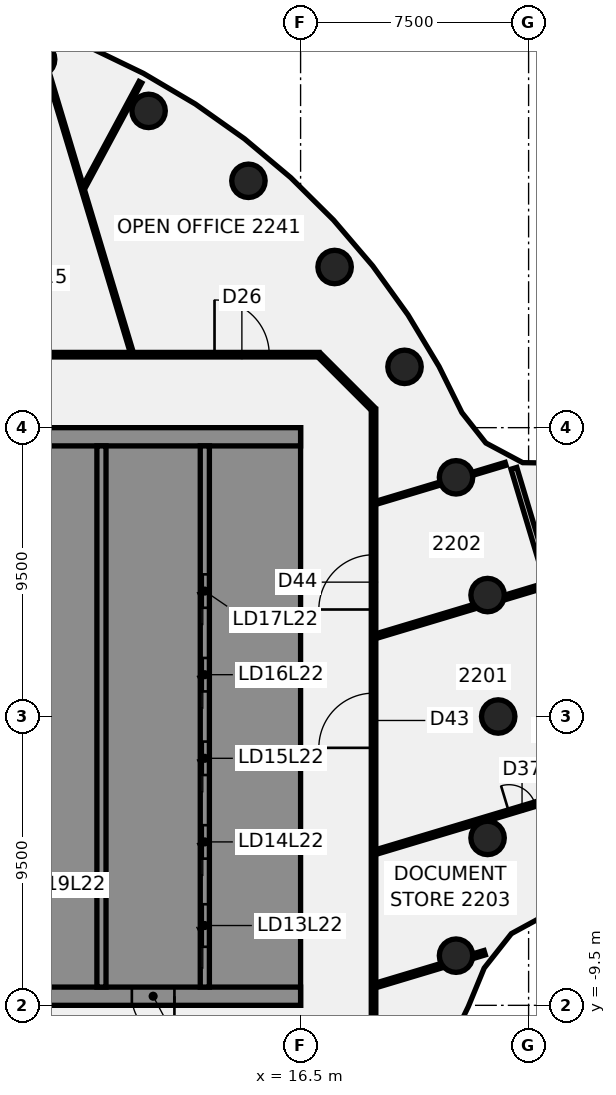
"""IFC4 building model, lengths in metres.
Left out: names, types, materials, properties, quantities, classifications, styles, units other than length and angle.
Written with IfcOpenShell. Run it as: python <this file> out.ifc"""

import sys

from ifc_helpers import new_model, si_unit, direction, frame, frame_2d, origin, origin_2d, place, context, subcontext, project, spatial, polyline, rectangle, circle, outline, extrude, element, fill, save


model = new_model("IFC4")
c1 = context("Model", 3, precision=1e-05, world=origin(), true_north=direction((0.0, 1.0)))
c2 = subcontext(c1, "Body", "Model", "MODEL_VIEW")
j1 = project(units=[si_unit("LENGTHUNIT", "METRE"), si_unit("PLANEANGLEUNIT", "RADIAN")], contexts=[c1])
p1 = place(None, origin())
s1 = spatial("IfcSite", under=j1, at=p1, CompositionType="ELEMENT")
p2 = place(p1, origin())
s2 = spatial("IfcBuilding", under=s1, at=p2, CompositionType="ELEMENT")
p3 = place(p2, frame((0.0, 0.0, 94.75)))
s3 = spatial("IfcBuildingStorey", under=s2, at=p3, CompositionType="ELEMENT", Elevation=94.75)
for number, where, z_axis, x_axis in (
    (1, (23.0, 0.0, -0.14), (0.0, 0.0, 1.0), (1.0, 0.0, 0.0)),
    (2, (22.651, 3.994, -0.14), (0.0, 0.0, 1.0), (1.0, 0.0, 0.0)),
    (3, (21.613, 7.866, -0.14), (0.0, 0.0, 1.0), (1.0, 0.0, 0.0)),
    (4, (19.919, 11.5, -0.14), (0.0, 0.0, 1.0), (1.0, 0.0, 0.0)),
    (5, (17.619, 14.784, -0.14), (0.0, 0.0, 1.0), (1.0, 0.0, 0.0)),
    (6, (14.784, 17.619, -0.14), (0.0, 0.0, 1.0), (1.0, 0.0, 0.0)),
    (7, (11.5, 19.919, -0.14), (0.0, 0.0, 1.0), (1.0, 0.0, 0.0)),
    (8, (7.866, 21.613, -0.14), (0.0, 0.0, 1.0), (1.0, 0.0, 0.0)),
    (9, (21.613, -7.866, -0.14), (0.0, 0.0, 1.0), (1.0, 0.0, 0.0)),
    (10, (22.651, -3.994, -0.14), (0.0, 0.0, 1.0), (1.0, 0.0, 0.0)),
):
    element("IfcColumn", number, at=place(p3, frame(where, z_axis=z_axis, x_axis=x_axis)), inside=s3, PredefinedType="COLUMN", context=c2, shape_type="SweptSolid", body=[
        extrude(circle(Radius=0.55, at=origin_2d()), origin(), (0.0, 0.0, 1.0), 3.75),
    ])
p4 = place(p3, frame((8.186, 21.167, 0.0), z_axis=(0.0, 0.0, 1.0), x_axis=(0.287669804992, -0.957729650421, 0.0)))
e11 = element("IfcWall", 11, at=p4, inside=s3, PredefinedType="PARTITIONING", context=c2, shape_type="SweptSolid", body=[
    extrude(rectangle(XDim=9.601, YDim=0.1, at=frame_2d((4.801, 0.0))), origin(), (0.0, 0.0, 1.0), 3.01),
])
p5 = place(p3, frame((23.516, 8.163, 0.0), z_axis=(0.0, 0.0, 1.0), x_axis=(0.287459233433, -0.957792873806, 0.0)))
e12 = element("IfcWall", 12, at=p5, inside=s3, PredefinedType="PARTITIONING", context=c2, shape_type="SweptSolid", body=[
    extrude(rectangle(XDim=14.081, YDim=0.2, at=frame_2d((7.04, 0.0))), origin(), (0.0, 0.0, 1.0), 3.01),
])
p6 = place(p5, frame((6.482, 0.0, 0.0)))
e13 = element("IfcOpeningElement", 13, at=p6, cuts=e12, PredefinedType="OPENING", context=c2, shape_type="SweptSolid", body=[
    extrude(rectangle(XDim=1.4, YDim=2.1, at=frame_2d((0.7, 1.05))), frame((0.0, 0.11, 0.0), z_axis=(0.0, -1.0, 0.0), x_axis=(1.0, 0.0, 0.0)), (0.0, 0.0, 1.0), 0.22),
])
p7 = place(p3, frame((17.128, 11.872, 0.0), z_axis=(0.0, 0.0, 1.0), x_axis=(0.707106781187, -0.707106781187, 0.0)))
e14 = element("IfcWall", 14, at=p7, inside=s3, PredefinedType="PARTITIONING", context=c2, shape_type="SweptSolid", body=[
    extrude(rectangle(XDim=2.465, YDim=0.15, at=frame_2d((1.232, 0.0))), origin(), (0.0, 0.0, 1.0), 3.01),
])
p8 = place(p3, frame((-17.065, 11.9, 0.0), z_axis=(0.0, 0.0, 1.0), x_axis=(1.0, 0.0, 0.0)))
e15 = element("IfcWall", 15, at=p8, inside=s3, PredefinedType="PARTITIONING", context=c2, shape_type="SweptSolid", body=[
    extrude(rectangle(XDim=34.165, YDim=0.15, at=frame_2d((17.083, 0.0))), origin(), (0.0, 0.0, 1.0), 3.01),
])
p9 = place(p8, frame((19.248, 0.0, 0.0)))
e16 = element("IfcOpeningElement", 16, at=p9, cuts=e15, PredefinedType="OPENING", context=c2, shape_type="SweptSolid", body=[
    extrude(rectangle(XDim=1.8, YDim=2.1, at=frame_2d((0.9, 1.05))), frame((0.0, 0.085, 0.0), z_axis=(0.0, -1.0, 0.0), x_axis=(1.0, 0.0, 0.0)), (0.0, 0.0, 1.0), 0.17),
])
p10 = place(p8, frame((30.734, 0.0, 0.0)))
e17 = element("IfcOpeningElement", 17, at=p10, cuts=e15, PredefinedType="OPENING", context=c2, shape_type="SweptSolid", body=[
    extrude(rectangle(XDim=1.8, YDim=2.1, at=frame_2d((0.9, 1.05))), frame((0.0, 0.085, 0.0), z_axis=(0.0, -1.0, 0.0), x_axis=(1.0, 0.0, 0.0)), (0.0, 0.0, 1.0), 0.17),
])
p11 = place(p8, frame((5.215, 0.0, 0.0)))
e18 = element("IfcOpeningElement", 18, at=p11, cuts=e15, PredefinedType="OPENING", context=c2, shape_type="SweptSolid", body=[
    extrude(rectangle(XDim=1.8, YDim=2.1, at=frame_2d((0.9, 1.05))), frame((0.0, 0.085, 0.0), z_axis=(0.0, -1.0, 0.0), x_axis=(1.0, 0.0, 0.0)), (0.0, 0.0, 1.0), 0.17),
])
p12 = place(p3, frame((18.977, -4.458, 0.0), z_axis=(0.0, 0.0, 1.0), x_axis=(0.957722947088, 0.287692121236, 0.0)))
e19 = element("IfcWall", 19, at=p12, inside=s3, PredefinedType="PARTITIONING", context=c2, shape_type="SweptSolid", body=[
    extrude(rectangle(XDim=7.873, YDim=0.15, at=frame_2d((3.936, 0.0))), origin(), (0.0, 0.0, 1.0), 3.01),
])
p13 = place(p12, frame((4.57, 0.0, 0.0)))
e20 = element("IfcOpeningElement", 20, at=p13, cuts=e19, PredefinedType="OPENING", context=c2, shape_type="SweptSolid", body=[
    extrude(rectangle(XDim=0.9, YDim=2.1, at=frame_2d((0.45, 1.05))), frame((0.0, 0.085, 0.0), z_axis=(0.0, -1.0, 0.0), x_axis=(1.0, 0.0, 0.0)), (0.0, 0.0, 1.0), 0.17),
])
p14 = place(p3, frame((18.977, 2.642, 0.0), z_axis=(0.0, 0.0, 1.0), x_axis=(0.957759484512, 0.287570460631, 0.0)))
e21 = element("IfcWall", 21, at=p14, inside=s3, PredefinedType="PARTITIONING", context=c2, shape_type="SweptSolid", body=[
    extrude(rectangle(XDim=3.421, YDim=0.15, at=frame_2d((1.711, 0.0))), origin(), (0.0, 0.0, 1.0), 3.01),
])
p15 = place(p3, frame((23.187, 3.906, 0.0), z_axis=(0.0, 0.0, 1.0), x_axis=(0.957756211779, 0.287581360313, 0.0)))
e22 = element("IfcWall", 22, at=p15, inside=s3, PredefinedType="PARTITIONING", context=c2, shape_type="SweptSolid", body=[
    extrude(rectangle(XDim=1.439, YDim=0.15, at=frame_2d((0.719, 0.0))), origin(), (0.0, 0.0, 1.0), 3.01),
])
p16 = place(p3, frame((18.972, 7.026, 0.0), z_axis=(0.0, 0.0, 1.0), x_axis=(0.95774183444, 0.287629238019, 0.0)))
e23 = element("IfcWall", 23, at=p16, inside=s3, PredefinedType="PARTITIONING", context=c2, shape_type="SweptSolid", body=[
    extrude(rectangle(XDim=2.229, YDim=0.1, at=frame_2d((1.115, 0.0))), origin(), (0.0, 0.0, 1.0), 3.01),
])
p17 = place(p3, frame((22.143, 7.978, 0.0), z_axis=(0.0, 0.0, 1.0), x_axis=(0.957738472146, 0.287640433477, 0.0)))
e24 = element("IfcWall", 24, at=p17, inside=s3, PredefinedType="PARTITIONING", context=c2, shape_type="SweptSolid", body=[
    extrude(rectangle(XDim=1.148, YDim=0.1, at=frame_2d((0.574, 0.0))), origin(), (0.0, 0.0, 1.0), 3.01),
])
p18 = place(p3, frame((18.977, -8.843, 0.0), z_axis=(0.0, 0.0, 1.0), x_axis=(0.957755743007, 0.287582921496, 0.0)))
e25 = element("IfcWall", 25, at=p18, inside=s3, PredefinedType="PARTITIONING", context=c2, shape_type="SweptSolid", body=[
    extrude(rectangle(XDim=2.287, YDim=0.15, at=frame_2d((1.144, 0.0))), origin(), (0.0, 0.0, 1.0), 3.01),
])
p19 = place(p3, frame((22.168, -7.885, 0.0), z_axis=(0.0, 0.0, 1.0), x_axis=(0.957726632794, 0.287679851286, 0.0)))
e26 = element("IfcWall", 26, at=p19, inside=s3, PredefinedType="PARTITIONING", context=c2, shape_type="SweptSolid", body=[
    extrude(rectangle(XDim=0.405, YDim=0.15, at=frame_2d((0.202, 0.0))), origin(), (0.0, 0.0, 1.0), 3.01),
])
p20 = place(p3, frame((9.383, 17.427, 0.0), z_axis=(0.0, 0.0, 1.0), x_axis=(0.47397663643, 0.880537420056, 0.0)))
e27 = element("IfcWall", 27, at=p20, inside=s3, PredefinedType="PARTITIONING", context=c2, shape_type="SweptSolid", body=[
    extrude(rectangle(XDim=3.9, YDim=0.1, at=frame_2d((1.95, 0.0))), origin(), (0.0, 0.0, 1.0), 3.01),
])
p21 = place(p3, frame((18.9, -10.1, 0.0), z_axis=(0.0, 0.0, 1.0), x_axis=(0.0, 1.0, 0.0)))
e28 = element("IfcWall", 28, at=p21, inside=s3, PredefinedType="PARTITIONING", context=c2, shape_type="SweptSolid", body=[
    extrude(rectangle(XDim=20.2, YDim=0.15, at=frame_2d((10.1, 0.0))), origin(), (0.0, 0.0, 1.0), 3.01),
])
p22 = place(p21, frame((9.069, 0.0, 0.0)))
e29 = element("IfcOpeningElement", 29, at=p22, cuts=e28, PredefinedType="OPENING", context=c2, shape_type="SweptSolid", body=[
    extrude(rectangle(XDim=1.8, YDim=2.1, at=frame_2d((0.9, 1.05))), frame((0.0, 0.085, 0.0), z_axis=(0.0, -1.0, 0.0), x_axis=(1.0, 0.0, 0.0)), (0.0, 0.0, 1.0), 0.17),
])
p23 = place(p21, frame((13.619, 0.0, 0.0)))
e30 = element("IfcOpeningElement", 30, at=p23, cuts=e28, PredefinedType="OPENING", context=c2, shape_type="SweptSolid", body=[
    extrude(rectangle(XDim=1.8, YDim=2.1, at=frame_2d((0.9, 1.05))), frame((0.0, 0.085, 0.0), z_axis=(0.0, -1.0, 0.0), x_axis=(1.0, 0.0, 0.0)), (0.0, 0.0, 1.0), 0.17),
])
p24 = place(p3, frame((16.5, -9.2, 0.0), z_axis=(0.0, 0.0, 1.0), x_axis=(-1.0, 0.0, 0.0)))
e31 = element("IfcWall", 31, at=p24, inside=s3, PredefinedType="SHEAR", context=c2, shape_type="SweptSolid", body=[
    extrude(rectangle(XDim=13.0, YDim=0.6, at=frame_2d((6.5, 0.0))), origin(), (0.0, 0.0, 1.0), 3.61),
])
p25 = place(p24, frame((4.15, 0.0, 0.0)))
e32 = element("IfcOpeningElement", 32, at=p25, cuts=e31, PredefinedType="OPENING", context=c2, shape_type="SweptSolid", body=[
    extrude(rectangle(XDim=1.4, YDim=2.1, at=frame_2d((0.7, 1.05))), frame((0.0, 0.31, 0.0), z_axis=(0.0, -1.0, 0.0), x_axis=(1.0, 0.0, 0.0)), (0.0, 0.0, 1.0), 0.62),
])
p26 = place(p24, frame((10.125, 0.0, 0.0)))
e33 = element("IfcOpeningElement", 33, at=p26, cuts=e31, PredefinedType="OPENING", context=c2, shape_type="SweptSolid", body=[
    extrude(rectangle(XDim=1.4, YDim=2.1, at=frame_2d((0.7, 1.05))), frame((0.0, 0.31, 0.0), z_axis=(0.0, -1.0, 0.0), x_axis=(1.0, 0.0, 0.0)), (0.0, 0.0, 1.0), 0.62),
])
p27 = place(p3, origin())
e34 = element("IfcWall", 34, at=p27, inside=s3, PredefinedType="SHEAR", context=c2, shape_type="SweptSolid", body=[
    extrude(outline(polyline([(13.5, -8.9), (15.9, -8.9), (16.5, -8.9), (16.5, 8.9), (15.9, 8.9), (13.5, 8.9), (13.5, 8.125), (15.9, 8.125), (15.9, 5.625), (13.5, 5.625), (13.5, 5.375), (15.9, 5.375), (15.9, 2.875), (13.5, 2.875), (13.5, 2.625), (15.9, 2.625), (15.9, 0.125), (13.5, 0.125), (13.5, -0.125), (15.9, -0.125), (15.9, -2.625), (13.5, -2.625), (13.5, -2.875), (15.9, -2.875), (15.9, -5.375), (13.5, -5.375), (13.5, -5.625), (15.9, -5.625), (15.9, -8.125), (13.5, -8.125), (13.5, -8.9)])), origin(), (0.0, 0.0, 1.0), 3.61),
])
p28 = place(p3, frame((16.5, 9.2, 0.0), z_axis=(0.0, 0.0, 1.0), x_axis=(-1.0, 0.0, 0.0)))
e35 = element("IfcWall", 35, at=p28, inside=s3, PredefinedType="SHEAR", context=c2, shape_type="SweptSolid", body=[
    extrude(rectangle(XDim=13.0, YDim=0.6, at=frame_2d((6.5, 0.0))), origin(), (0.0, 0.0, 1.0), 3.61),
])
p29 = place(p3, origin())
e36 = element("IfcWall", 36, at=p29, inside=s3, PredefinedType="SHEAR", context=c2, shape_type="SweptSolid", body=[
    extrude(outline(polyline([(9.8, -5.375), (7.5, -5.375), (7.5, -2.875), (9.8, -2.875), (9.8, -2.625), (7.5, -2.625), (7.5, -0.125), (9.8, -0.125), (9.8, 0.125), (7.5, 0.125), (7.5, 2.625), (9.8, 2.625), (9.8, 2.875), (7.5, 2.875), (7.5, 5.375), (9.8, 5.375), (9.8, 5.625), (7.5, 5.625), (7.5, 8.125), (9.8, 8.125), (9.8, 8.9), (7.5, 8.9), (7.2, 8.9), (7.2, -5.625), (7.5, -5.625), (9.8, -5.625), (9.8, -5.375)])), origin(), (0.0, 0.0, 1.0), 3.61),
])
p30 = place(p3, origin())
e37 = element("IfcWall", 37, at=p30, inside=s3, PredefinedType="SHEAR", context=c2, shape_type="SweptSolid", body=[
    extrude(outline(polyline([(7.5, -8.125), (7.5, -8.9), (9.8, -8.9), (9.8, -8.125), (9.8, -5.625), (9.55, -5.625), (9.55, -8.125), (7.5, -8.125)])), origin(), (0.0, 0.0, 1.0), 3.61),
])
p31 = place(p3, frame((13.35, -8.9, 0.0), z_axis=(0.0, 0.0, 1.0), x_axis=(0.0, 1.0, 0.0)))
e38 = element("IfcWall", 38, at=p31, inside=s3, PredefinedType="SHEAR", context=c2, shape_type="SweptSolid", body=[
    extrude(rectangle(XDim=17.8, YDim=0.3, at=frame_2d((8.9, 0.0))), origin(), (0.0, 0.0, 1.0), 3.61),
])
p32 = place(p31, frame((1.325, 0.0, 0.0)))
e39 = element("IfcOpeningElement", 39, at=p32, cuts=e38, PredefinedType="OPENING", context=c2, shape_type="SweptSolid", body=[
    extrude(rectangle(XDim=1.4, YDim=2.1, at=frame_2d((0.7, 1.05))), frame((0.0, 0.16, 0.0), z_axis=(0.0, -1.0, 0.0), x_axis=(1.0, 0.0, 0.0)), (0.0, 0.0, 1.0), 0.32),
])
p33 = place(p31, frame((4.225, 0.0, 0.0)))
e40 = element("IfcOpeningElement", 40, at=p33, cuts=e38, PredefinedType="OPENING", context=c2, shape_type="SweptSolid", body=[
    extrude(rectangle(XDim=1.1, YDim=2.1, at=frame_2d((0.55, 1.05))), frame((0.0, 0.16, 0.0), z_axis=(0.0, -1.0, 0.0), x_axis=(1.0, 0.0, 0.0)), (0.0, 0.0, 1.0), 0.32),
])
p34 = place(p31, frame((6.975, 0.0, 0.0)))
e41 = element("IfcOpeningElement", 41, at=p34, cuts=e38, PredefinedType="OPENING", context=c2, shape_type="SweptSolid", body=[
    extrude(rectangle(XDim=1.1, YDim=2.1, at=frame_2d((0.55, 1.05))), frame((0.0, 0.16, 0.0), z_axis=(0.0, -1.0, 0.0), x_axis=(1.0, 0.0, 0.0)), (0.0, 0.0, 1.0), 0.32),
])
p35 = place(p31, frame((9.725, 0.0, 0.0)))
e42 = element("IfcOpeningElement", 42, at=p35, cuts=e38, PredefinedType="OPENING", context=c2, shape_type="SweptSolid", body=[
    extrude(rectangle(XDim=1.1, YDim=2.1, at=frame_2d((0.55, 1.05))), frame((0.0, 0.16, 0.0), z_axis=(0.0, -1.0, 0.0), x_axis=(1.0, 0.0, 0.0)), (0.0, 0.0, 1.0), 0.32),
])
p36 = place(p31, frame((12.475, 0.0, 0.0)))
e43 = element("IfcOpeningElement", 43, at=p36, cuts=e38, PredefinedType="OPENING", context=c2, shape_type="SweptSolid", body=[
    extrude(rectangle(XDim=1.1, YDim=2.1, at=frame_2d((0.55, 1.05))), frame((0.0, 0.16, 0.0), z_axis=(0.0, -1.0, 0.0), x_axis=(1.0, 0.0, 0.0)), (0.0, 0.0, 1.0), 0.32),
])
p37 = place(p3, frame((9.95, -8.9, 0.0), z_axis=(0.0, 0.0, 1.0), x_axis=(0.0, 1.0, 0.0)))
e44 = element("IfcWall", 44, at=p37, inside=s3, PredefinedType="SHEAR", context=c2, shape_type="SweptSolid", body=[
    extrude(rectangle(XDim=17.8, YDim=0.3, at=frame_2d((8.9, 0.0))), origin(), (0.0, 0.0, 1.0), 3.61),
])
p38 = place(p10, origin())
e45 = element("IfcDoor", 45, at=p38, inside=s3, OperationType="DOUBLE_DOOR_SINGLE_SWING", PredefinedType="DOOR", context=c2, shape_type="SweptSolid", body=[
    extrude(rectangle(XDim=1.8, YDim=2.1, at=frame_2d((0.9, 1.05))), frame((0.0, 0.025, 0.0), z_axis=(0.0, -1.0, 0.0), x_axis=(1.0, 0.0, 0.0)), (0.0, 0.0, 1.0), 0.05),
])
fill(e17, e45)
p39 = place(p13, frame((0.9, 0.0, 0.0), z_axis=(0.0, 0.0, 1.0), x_axis=(-1.0, 0.0, 0.0)))
e46 = element("IfcDoor", 46, at=p39, inside=s3, OperationType="SINGLE_SWING_RIGHT", PredefinedType="DOOR", context=c2, shape_type="SweptSolid", body=[
    extrude(rectangle(XDim=0.9, YDim=2.1, at=frame_2d((0.45, 1.05))), frame((0.0, 0.025, 0.0), z_axis=(0.0, -1.0, 0.0), x_axis=(1.0, 0.0, 0.0)), (0.0, 0.0, 1.0), 0.05),
])
fill(e20, e46)
p40 = place(p22, origin())
e47 = element("IfcDoor", 47, at=p40, inside=s3, OperationType="DOUBLE_DOOR_SINGLE_SWING", PredefinedType="DOOR", context=c2, shape_type="SweptSolid", body=[
    extrude(rectangle(XDim=1.8, YDim=2.1, at=frame_2d((0.9, 1.05))), frame((0.0, 0.025, 0.0), z_axis=(0.0, -1.0, 0.0), x_axis=(1.0, 0.0, 0.0)), (0.0, 0.0, 1.0), 0.05),
])
fill(e29, e47)
p41 = place(p23, frame((1.8, 0.0, 0.0), z_axis=(0.0, 0.0, 1.0), x_axis=(-1.0, 0.0, 0.0)))
e48 = element("IfcDoor", 48, at=p41, inside=s3, OperationType="DOUBLE_DOOR_SINGLE_SWING", PredefinedType="DOOR", context=c2, shape_type="SweptSolid", body=[
    extrude(rectangle(XDim=1.8, YDim=2.1, at=frame_2d((0.9, 1.05))), frame((0.0, 0.025, 0.0), z_axis=(0.0, -1.0, 0.0), x_axis=(1.0, 0.0, 0.0)), (0.0, 0.0, 1.0), 0.05),
])
fill(e30, e48)
p42 = place(p25, origin())
e49 = element("IfcDoor", 49, at=p42, inside=s3, OperationType="SINGLE_SWING_LEFT", PredefinedType="DOOR", context=c2, shape_type="SweptSolid", body=[
    extrude(rectangle(XDim=1.4, YDim=2.1, at=frame_2d((0.7, 1.05))), frame((0.0, 0.025, 0.0), z_axis=(0.0, -1.0, 0.0), x_axis=(1.0, 0.0, 0.0)), (0.0, 0.0, 1.0), 0.05),
])
fill(e32, e49)
p43 = place(p32, origin())
e50 = element("IfcDoor", 50, at=p43, inside=s3, OperationType="SLIDING_TO_LEFT", PredefinedType="DOOR", context=c2, shape_type="SweptSolid", body=[
    extrude(rectangle(XDim=1.4, YDim=2.1, at=frame_2d((0.7, 1.05))), frame((0.0, 0.025, 0.0), z_axis=(0.0, -1.0, 0.0), x_axis=(1.0, 0.0, 0.0)), (0.0, 0.0, 1.0), 0.05),
])
fill(e39, e50)
p44 = place(p33, origin())
e51 = element("IfcDoor", 51, at=p44, inside=s3, OperationType="SLIDING_TO_LEFT", PredefinedType="DOOR", context=c2, shape_type="SweptSolid", body=[
    extrude(rectangle(XDim=1.1, YDim=2.1, at=frame_2d((0.55, 1.05))), frame((0.0, 0.025, 0.0), z_axis=(0.0, -1.0, 0.0), x_axis=(1.0, 0.0, 0.0)), (0.0, 0.0, 1.0), 0.05),
])
fill(e40, e51)
p45 = place(p34, origin())
e52 = element("IfcDoor", 52, at=p45, inside=s3, OperationType="SLIDING_TO_LEFT", PredefinedType="DOOR", context=c2, shape_type="SweptSolid", body=[
    extrude(rectangle(XDim=1.1, YDim=2.1, at=frame_2d((0.55, 1.05))), frame((0.0, 0.025, 0.0), z_axis=(0.0, -1.0, 0.0), x_axis=(1.0, 0.0, 0.0)), (0.0, 0.0, 1.0), 0.05),
])
fill(e41, e52)
p46 = place(p35, origin())
e53 = element("IfcDoor", 53, at=p46, inside=s3, OperationType="SLIDING_TO_LEFT", PredefinedType="DOOR", context=c2, shape_type="SweptSolid", body=[
    extrude(rectangle(XDim=1.1, YDim=2.1, at=frame_2d((0.55, 1.05))), frame((0.0, 0.025, 0.0), z_axis=(0.0, -1.0, 0.0), x_axis=(1.0, 0.0, 0.0)), (0.0, 0.0, 1.0), 0.05),
])
fill(e42, e53)
p47 = place(p36, origin())
e54 = element("IfcDoor", 54, at=p47, inside=s3, OperationType="SLIDING_TO_LEFT", PredefinedType="DOOR", context=c2, shape_type="SweptSolid", body=[
    extrude(rectangle(XDim=1.1, YDim=2.1, at=frame_2d((0.55, 1.05))), frame((0.0, 0.025, 0.0), z_axis=(0.0, -1.0, 0.0), x_axis=(1.0, 0.0, 0.0)), (0.0, 0.0, 1.0), 0.05),
])
fill(e43, e54)
save(model, sys.argv[1])
